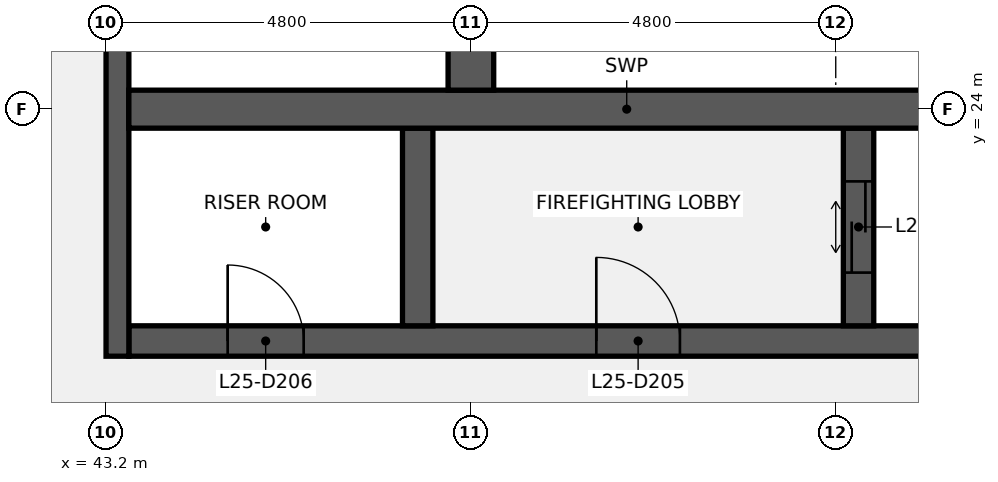
"""IFC4 building model, lengths in metres.
Left out: names, types, materials, properties, quantities, classifications, styles, units other than length and angle.
Written with IfcOpenShell. Run it as: python <this file> out.ifc"""

import sys

from ifc_helpers import new_model, si_unit, direction, frame, frame_2d, origin, place, context, subcontext, project, spatial, rectangle, extrude, element, fill, save


model = new_model("IFC4")
c1 = context("Model", 3, precision=1e-05, world=origin(), true_north=direction((0.0, 1.0)))
c2 = subcontext(c1, "Body", "Model", "MODEL_VIEW")
j1 = project(units=[si_unit("LENGTHUNIT", "METRE"), si_unit("PLANEANGLEUNIT", "RADIAN")], contexts=[c1])
p1 = place(None, origin())
s1 = spatial("IfcSite", under=j1, at=p1, CompositionType="ELEMENT")
p2 = place(p1, origin())
s2 = spatial("IfcBuilding", under=s1, at=p2, CompositionType="ELEMENT")
p3 = place(p2, frame((0.0, 0.0, 120.1)))
s3 = spatial("IfcBuildingStorey", under=s2, at=p3, CompositionType="ELEMENT", Elevation=120.1)
p4 = place(p3, frame((43.5, 20.95, 0.0), z_axis=(0.0, 0.0, 1.0), x_axis=(1.0, 0.0, 0.0)))
e1 = element("IfcWall", 1, at=p4, inside=s3, PredefinedType="SHEAR", context=c2, shape_type="SweptSolid", body=[
    extrude(rectangle(XDim=13.1, YDim=0.4, at=frame_2d((6.55, 0.0))), origin(), (0.0, 0.0, 1.0), 3.84),
])
p5 = place(p4, frame((6.15, 0.0, 0.0)))
e2 = element("IfcOpeningElement", 2, at=p5, cuts=e1, PredefinedType="OPENING", context=c2, shape_type="SweptSolid", body=[
    extrude(rectangle(XDim=1.1, YDim=2.1, at=frame_2d((0.55, 1.05))), frame((0.0, 0.21, 0.0), z_axis=(0.0, -1.0, 0.0), x_axis=(1.0, 0.0, 0.0)), (0.0, 0.0, 1.0), 0.42),
])
p6 = place(p4, frame((1.3, 0.0, 0.0)))
e3 = element("IfcOpeningElement", 3, at=p6, cuts=e1, PredefinedType="OPENING", context=c2, shape_type="SweptSolid", body=[
    extrude(rectangle(XDim=1.0, YDim=2.1, at=frame_2d((0.5, 1.05))), frame((0.0, 0.21, 0.0), z_axis=(0.0, -1.0, 0.0), x_axis=(1.0, 0.0, 0.0)), (0.0, 0.0, 1.0), 0.42),
])
p7 = place(p3, frame((43.35, 20.75, 0.0), z_axis=(0.0, 0.0, 1.0), x_axis=(0.0, 1.0, 0.0)))
e4 = element("IfcWall", 4, at=p7, inside=s3, PredefinedType="SHEAR", context=c2, shape_type="SweptSolid", body=[
    extrude(rectangle(XDim=6.5, YDim=0.3, at=frame_2d((3.25, 0.0))), origin(), (0.0, 0.0, 1.0), 3.84),
])
p8 = place(p3, frame((53.1, 21.15, 0.0), z_axis=(0.0, 0.0, 1.0), x_axis=(0.0, 1.0, 0.0)))
e5 = element("IfcWall", 5, at=p8, inside=s3, PredefinedType="SHEAR", context=c2, shape_type="SweptSolid", body=[
    extrude(rectangle(XDim=2.6, YDim=0.4, at=frame_2d((1.3, 0.0))), origin(), (0.0, 0.0, 1.0), 3.84),
])
p9 = place(p8, frame((0.7, 0.0, 0.0)))
e6 = element("IfcOpeningElement", 6, at=p9, cuts=e5, PredefinedType="OPENING", context=c2, shape_type="SweptSolid", body=[
    extrude(rectangle(XDim=1.2, YDim=2.1, at=frame_2d((0.6, 1.05))), frame((0.0, 0.21, 0.0), z_axis=(0.0, -1.0, 0.0), x_axis=(1.0, 0.0, 0.0)), (0.0, 0.0, 1.0), 0.42),
])
p10 = place(p3, frame((47.3, 21.15, 0.0), z_axis=(0.0, 0.0, 1.0), x_axis=(0.0, 1.0, 0.0)))
e7 = element("IfcWall", 7, at=p10, inside=s3, PredefinedType="SHEAR", context=c2, shape_type="SweptSolid", body=[
    extrude(rectangle(XDim=2.6, YDim=0.4, at=frame_2d((1.3, 0.0))), origin(), (0.0, 0.0, 1.0), 3.84),
])
p11 = place(p3, frame((43.5, 24.0, 0.0), z_axis=(0.0, 0.0, 1.0), x_axis=(1.0, 0.0, 0.0)))
e8 = element("IfcWall", 8, at=p11, inside=s3, PredefinedType="SHEAR", context=c2, shape_type="SweptSolid", body=[
    extrude(rectangle(XDim=13.1, YDim=0.5, at=frame_2d((6.55, 0.0))), origin(), (0.0, 0.0, 1.0), 3.84),
])
p12 = place(p3, frame((48.0, 24.25, 0.0), z_axis=(0.0, 0.0, 1.0), x_axis=(0.0, 1.0, 0.0)))
e9 = element("IfcWall", 9, at=p12, inside=s3, PredefinedType="SHEAR", context=c2, shape_type="SweptSolid", body=[
    extrude(rectangle(XDim=2.6, YDim=0.6, at=frame_2d((1.3, 0.0))), origin(), (0.0, 0.0, 1.0), 3.84),
])
p13 = place(p5, origin())
e10 = element("IfcDoor", 10, at=p13, inside=s3, OperationType="SINGLE_SWING_LEFT", PredefinedType="DOOR", context=c2, shape_type="SweptSolid", body=[
    extrude(rectangle(XDim=1.1, YDim=2.1, at=frame_2d((0.55, 1.05))), frame((0.0, 0.025, 0.0), z_axis=(0.0, -1.0, 0.0), x_axis=(1.0, 0.0, 0.0)), (0.0, 0.0, 1.0), 0.05),
])
fill(e2, e10)
p14 = place(p6, origin())
e11 = element("IfcDoor", 11, at=p14, inside=s3, OperationType="SINGLE_SWING_LEFT", PredefinedType="DOOR", context=c2, shape_type="SweptSolid", body=[
    extrude(rectangle(XDim=1.0, YDim=2.1, at=frame_2d((0.5, 1.05))), frame((0.0, 0.025, 0.0), z_axis=(0.0, -1.0, 0.0), x_axis=(1.0, 0.0, 0.0)), (0.0, 0.0, 1.0), 0.05),
])
fill(e3, e11)
p15 = place(p9, origin())
e12 = element("IfcDoor", 12, at=p15, inside=s3, OperationType="DOUBLE_DOOR_SLIDING", PredefinedType="DOOR", context=c2, shape_type="SweptSolid", body=[
    extrude(rectangle(XDim=1.2, YDim=2.1, at=frame_2d((0.6, 1.05))), frame((0.0, 0.025, 0.0), z_axis=(0.0, -1.0, 0.0), x_axis=(1.0, 0.0, 0.0)), (0.0, 0.0, 1.0), 0.05),
])
fill(e6, e12)
save(model, sys.argv[1])
